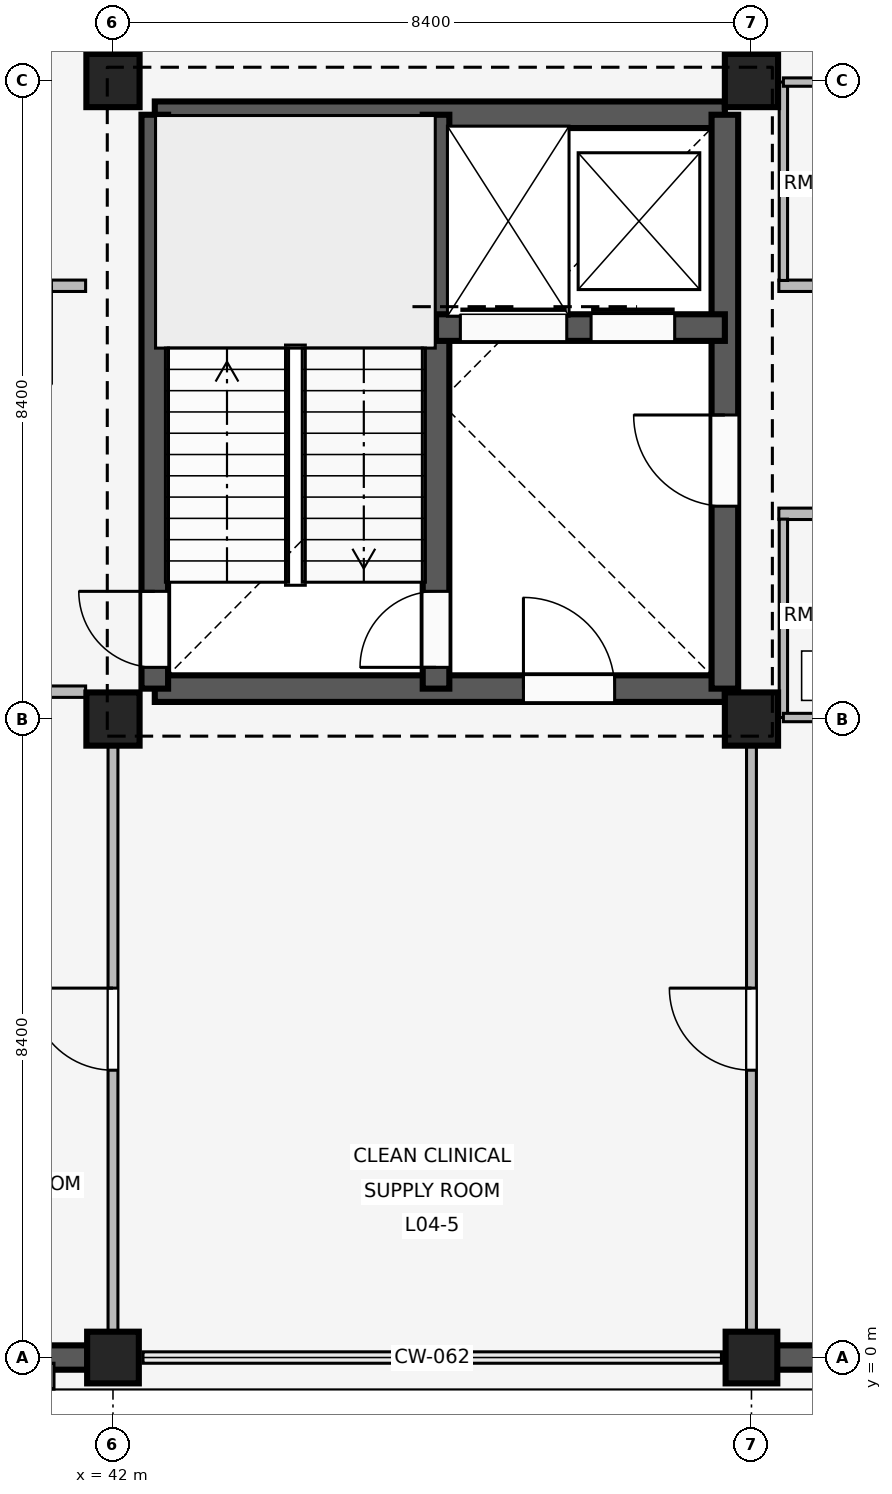
"""IFC4 building model, lengths in metres.
Left out: names, types, materials, properties, quantities, classifications, styles, units other than length and angle.
Written with IfcOpenShell. Run it as: python <this file> out.ifc"""

import sys

from ifc_helpers import new_model, si_unit, direction, frame, frame_2d, origin, origin_2d, place, context, subcontext, project, spatial, rectangle, extrude, element, fill, save


model = new_model("IFC4")
c1 = context("Model", 3, precision=1e-05, world=origin(), true_north=direction((0.0, 1.0)))
c2 = subcontext(c1, "Body", "Model", "MODEL_VIEW")
j1 = project(units=[si_unit("LENGTHUNIT", "METRE"), si_unit("PLANEANGLEUNIT", "RADIAN")], contexts=[c1])
p1 = place(None, origin())
s1 = spatial("IfcSite", under=j1, at=p1, CompositionType="ELEMENT")
p2 = place(p1, origin())
s2 = spatial("IfcBuilding", under=s1, at=p2, CompositionType="ELEMENT")
p3 = place(p2, frame((0.0, 0.0, 16.2)))
s3 = spatial("IfcBuildingStorey", under=s2, at=p3, CompositionType="ELEMENT", Elevation=16.2)
p4 = place(p3, frame((42.0, 0.0, 0.0), z_axis=(0.0, 0.0, 1.0), x_axis=(1.0, 0.0, 0.0)))
e1 = element("IfcColumn", 1, at=p4, inside=s3, PredefinedType="COLUMN", context=c2, shape_type="SweptSolid", body=[
    extrude(rectangle(XDim=0.68, YDim=0.68, at=origin_2d()), origin(), (0.0, 0.0, 1.0), 4.2),
])
for number, where, z_axis, x_axis in (
    (2, (42.0, 8.4, 0.0), (0.0, 0.0, 1.0), (1.0, 0.0, 0.0)),
    (3, (42.0, 16.8, 0.0), (0.0, 0.0, 1.0), (1.0, 0.0, 0.0)),
):
    element("IfcColumn", number, at=place(p3, frame(where, z_axis=z_axis, x_axis=x_axis)), inside=s3, PredefinedType="COLUMN", context=c2, shape_type="SweptSolid", body=[
        extrude(rectangle(XDim=0.7, YDim=0.7, at=origin_2d()), origin(), (0.0, 0.0, 1.0), 4.2),
    ])
p5 = place(p3, frame((50.4, 0.0, 0.0), z_axis=(0.0, 0.0, 1.0), x_axis=(1.0, 0.0, 0.0)))
e4 = element("IfcColumn", 4, at=p5, inside=s3, PredefinedType="COLUMN", context=c2, shape_type="SweptSolid", body=[
    extrude(rectangle(XDim=0.68, YDim=0.68, at=origin_2d()), origin(), (0.0, 0.0, 1.0), 4.2),
])
for number, where, z_axis, x_axis in (
    (5, (50.4, 8.4, 0.0), (0.0, 0.0, 1.0), (1.0, 0.0, 0.0)),
    (6, (50.4, 16.8, 0.0), (0.0, 0.0, 1.0), (1.0, 0.0, 0.0)),
):
    element("IfcColumn", number, at=place(p3, frame(where, z_axis=z_axis, x_axis=x_axis)), inside=s3, PredefinedType="COLUMN", context=c2, shape_type="SweptSolid", body=[
        extrude(rectangle(XDim=0.7, YDim=0.7, at=origin_2d()), origin(), (0.0, 0.0, 1.0), 4.2),
    ])
p6 = place(p3, frame((41.665, 0.0, 0.0), z_axis=(0.0, 0.0, 1.0), x_axis=(-1.0, 0.0, 0.0)))
e7 = element("IfcWall", 7, at=p6, inside=s3, PredefinedType="SOLIDWALL", context=c2, shape_type="SweptSolid", body=[
    extrude(rectangle(XDim=7.73, YDim=0.32, at=frame_2d((3.865, 0.0))), origin(), (0.0, 0.0, 1.0), 3.32),
])
p7 = place(p6, frame((0.52, 0.0, 0.85)))
e8 = element("IfcOpeningElement", 8, at=p7, cuts=e7, PredefinedType="OPENING", context=c2, shape_type="SweptSolid", body=[
    extrude(rectangle(XDim=1.44, YDim=1.62, at=frame_2d((0.72, 0.81))), frame((0.0, 0.17, 0.0), z_axis=(0.0, -1.0, 0.0), x_axis=(1.0, 0.0, 0.0)), (0.0, 0.0, 1.0), 0.34),
])
p8 = place(p6, frame((5.232, 0.0, 0.85)))
e9 = element("IfcOpeningElement", 9, at=p8, cuts=e7, PredefinedType="OPENING", context=c2, shape_type="SweptSolid", body=[
    extrude(rectangle(XDim=1.44, YDim=1.62, at=frame_2d((0.72, 0.81))), frame((0.0, 0.17, 0.0), z_axis=(0.0, -1.0, 0.0), x_axis=(1.0, 0.0, 0.0)), (0.0, 0.0, 1.0), 0.34),
])
p9 = place(p3, frame((41.124, -0.075, 0.0), z_axis=(0.0, 0.0, 1.0), x_axis=(0.0, -1.0, 0.0)))
e10 = element("IfcWall", 10, at=p9, inside=s3, PredefinedType="ELEMENTEDWALL", context=c2, shape_type="SweptSolid", body=[
    extrude(rectangle(XDim=0.34, YDim=0.2, at=frame_2d((0.17, 0.0))), origin(), (0.0, 0.0, 1.0), 3.3),
])
p10 = place(p3, frame((58.465, 0.0, 0.0), z_axis=(0.0, 0.0, 1.0), x_axis=(-1.0, 0.0, 0.0)))
e11 = element("IfcWall", 11, at=p10, inside=s3, PredefinedType="SOLIDWALL", context=c2, shape_type="SweptSolid", body=[
    extrude(rectangle(XDim=7.73, YDim=0.32, at=frame_2d((3.865, 0.0))), origin(), (0.0, 0.0, 1.0), 3.32),
])
p11 = place(p10, frame((1.148, 0.0, 0.85)))
e12 = element("IfcOpeningElement", 12, at=p11, cuts=e11, PredefinedType="OPENING", context=c2, shape_type="SweptSolid", body=[
    extrude(rectangle(XDim=1.26, YDim=1.52, at=frame_2d((0.63, 0.76))), frame((0.0, 0.17, 0.0), z_axis=(0.0, -1.0, 0.0), x_axis=(1.0, 0.0, 0.0)), (0.0, 0.0, 1.0), 0.34),
])
p12 = place(p10, frame((5.322, 0.0, 0.85)))
e13 = element("IfcOpeningElement", 13, at=p12, cuts=e11, PredefinedType="OPENING", context=c2, shape_type="SweptSolid", body=[
    extrude(rectangle(XDim=1.26, YDim=1.52, at=frame_2d((0.63, 0.76))), frame((0.0, 0.17, 0.0), z_axis=(0.0, -1.0, 0.0), x_axis=(1.0, 0.0, 0.0)), (0.0, 0.0, 1.0), 0.34),
])
p13 = place(p3, frame((42.55, 8.8, 0.0), z_axis=(0.0, 0.0, 1.0), x_axis=(1.0, 0.0, 0.0)))
e14 = element("IfcWall", 14, at=p13, inside=s3, PredefinedType="SHEAR", context=c2, shape_type="SweptSolid", body=[
    extrude(rectangle(XDim=7.5, YDim=0.35, at=frame_2d((3.75, 0.0))), origin(), (0.0, 0.0, 1.0), 3.92),
])
p14 = place(p13, frame((4.85, 0.0, 0.0)))
e15 = element("IfcOpeningElement", 15, at=p14, cuts=e14, PredefinedType="OPENING", context=c2, shape_type="SweptSolid", body=[
    extrude(rectangle(XDim=1.2, YDim=2.2, at=frame_2d((0.6, 1.1))), frame((0.0, 0.185, 0.0), z_axis=(0.0, -1.0, 0.0), x_axis=(1.0, 0.0, 0.0)), (0.0, 0.0, 1.0), 0.37),
])
p15 = place(p3, frame((42.55, 16.35, 0.0), z_axis=(0.0, 0.0, 1.0), x_axis=(1.0, 0.0, 0.0)))
e16 = element("IfcWall", 16, at=p15, inside=s3, PredefinedType="SHEAR", context=c2, shape_type="SweptSolid", body=[
    extrude(rectangle(XDim=7.5, YDim=0.35, at=frame_2d((3.75, 0.0))), origin(), (0.0, 0.0, 1.0), 3.92),
])
p16 = place(p3, frame((42.55, 8.8, 0.0), z_axis=(0.0, 0.0, 1.0), x_axis=(0.0, 1.0, 0.0)))
e17 = element("IfcWall", 17, at=p16, inside=s3, PredefinedType="SHEAR", context=c2, shape_type="SweptSolid", body=[
    extrude(rectangle(XDim=7.55, YDim=0.35, at=frame_2d((3.775, 0.0))), origin(), (0.0, 0.0, 1.0), 3.92),
])
p17 = place(p16, frame((0.28, 0.0, 0.0)))
e18 = element("IfcOpeningElement", 18, at=p17, cuts=e17, PredefinedType="OPENING", context=c2, shape_type="SweptSolid", body=[
    extrude(rectangle(XDim=1.0, YDim=2.15, at=frame_2d((0.5, 1.075))), frame((0.0, 0.185, 0.0), z_axis=(0.0, -1.0, 0.0), x_axis=(1.0, 0.0, 0.0)), (0.0, 0.0, 1.0), 0.37),
])
p18 = place(p3, frame((50.05, 8.8, 0.0), z_axis=(0.0, 0.0, 1.0), x_axis=(0.0, 1.0, 0.0)))
e19 = element("IfcWall", 19, at=p18, inside=s3, PredefinedType="SHEAR", context=c2, shape_type="SweptSolid", body=[
    extrude(rectangle(XDim=7.55, YDim=0.35, at=frame_2d((3.775, 0.0))), origin(), (0.0, 0.0, 1.0), 3.92),
])
p19 = place(p18, frame((2.4, 0.0, 0.0)))
e20 = element("IfcOpeningElement", 20, at=p19, cuts=e19, PredefinedType="OPENING", context=c2, shape_type="SweptSolid", body=[
    extrude(rectangle(XDim=1.2, YDim=2.2, at=frame_2d((0.6, 1.1))), frame((0.0, 0.185, 0.0), z_axis=(0.0, -1.0, 0.0), x_axis=(1.0, 0.0, 0.0)), (0.0, 0.0, 1.0), 0.37),
])
p20 = place(p3, frame((46.25, 8.8, 0.0), z_axis=(0.0, 0.0, 1.0), x_axis=(0.0, 1.0, 0.0)))
e21 = element("IfcWall", 21, at=p20, inside=s3, PredefinedType="SHEAR", context=c2, shape_type="SweptSolid", body=[
    extrude(rectangle(XDim=7.55, YDim=0.35, at=frame_2d((3.775, 0.0))), origin(), (0.0, 0.0, 1.0), 3.92),
])
p21 = place(p20, frame((0.28, 0.0, 0.0)))
e22 = element("IfcOpeningElement", 22, at=p21, cuts=e21, PredefinedType="OPENING", context=c2, shape_type="SweptSolid", body=[
    extrude(rectangle(XDim=1.0, YDim=2.15, at=frame_2d((0.5, 1.075))), frame((0.0, 0.185, 0.0), z_axis=(0.0, -1.0, 0.0), x_axis=(1.0, 0.0, 0.0)), (0.0, 0.0, 1.0), 0.37),
])
p22 = place(p3, frame((46.25, 13.55, 0.0), z_axis=(0.0, 0.0, 1.0), x_axis=(1.0, 0.0, 0.0)))
e23 = element("IfcWall", 23, at=p22, inside=s3, PredefinedType="SHEAR", context=c2, shape_type="SweptSolid", body=[
    extrude(rectangle(XDim=3.8, YDim=0.35, at=frame_2d((1.9, 0.0))), origin(), (0.0, 0.0, 1.0), 3.92),
])
p23 = place(p22, frame((0.32, 0.0, 0.0)))
e24 = element("IfcOpeningElement", 24, at=p23, cuts=e23, PredefinedType="OPENING", context=c2, shape_type="SweptSolid", body=[
    extrude(rectangle(XDim=1.4, YDim=2.25, at=frame_2d((0.7, 1.125))), frame((0.0, 0.185, 0.0), z_axis=(0.0, -1.0, 0.0), x_axis=(1.0, 0.0, 0.0)), (0.0, 0.0, 1.0), 0.37),
])
p24 = place(p22, frame((2.04, 0.0, 0.0)))
e25 = element("IfcOpeningElement", 25, at=p24, cuts=e23, PredefinedType="OPENING", context=c2, shape_type="SweptSolid", body=[
    extrude(rectangle(XDim=1.1, YDim=2.15, at=frame_2d((0.55, 1.075))), frame((0.0, 0.185, 0.0), z_axis=(0.0, -1.0, 0.0), x_axis=(1.0, 0.0, 0.0)), (0.0, 0.0, 1.0), 0.37),
])
p25 = place(p3, frame((39.46, 8.76, 0.0), z_axis=(0.0, 0.0, 1.0), x_axis=(1.0, 0.0, 0.0)))
e26 = element("IfcWall", 26, at=p25, inside=s3, PredefinedType="PARTITIONING", context=c2, shape_type="SweptSolid", body=[
    extrude(rectangle(XDim=2.18, YDim=0.15, at=frame_2d((1.09, 0.0))), origin(), (0.0, 0.0, 1.0), 3.3),
])
p26 = place(p25, frame((0.5, 0.0, 0.0)))
e27 = element("IfcOpeningElement", 27, at=p26, cuts=e26, PredefinedType="OPENING", context=c2, shape_type="SweptSolid", body=[
    extrude(rectangle(XDim=1.08, YDim=2.15, at=frame_2d((0.54, 1.075))), frame((0.0, 0.085, 0.0), z_axis=(0.0, -1.0, 0.0), x_axis=(1.0, 0.0, 0.0)), (0.0, 0.0, 1.0), 0.17),
])
p27 = place(p3, frame((41.64, 14.1, 0.0), z_axis=(0.0, 0.0, 1.0), x_axis=(-1.0, 0.0, 0.0)))
e28 = element("IfcWall", 28, at=p27, inside=s3, PredefinedType="PARTITIONING", context=c2, shape_type="SweptSolid", body=[
    extrude(rectangle(XDim=7.96, YDim=0.15, at=frame_2d((3.98, 0.0))), origin(), (0.0, 0.0, 1.0), 3.3),
])
p28 = place(p27, frame((0.45, 0.0, 0.0)))
e29 = element("IfcOpeningElement", 29, at=p28, cuts=e28, PredefinedType="OPENING", context=c2, shape_type="SweptSolid", body=[
    extrude(rectangle(XDim=1.3, YDim=2.25, at=frame_2d((0.65, 1.125))), frame((0.0, 0.085, 0.0), z_axis=(0.0, -1.0, 0.0), x_axis=(1.0, 0.0, 0.0)), (0.0, 0.0, 1.0), 0.17),
])
p29 = place(p27, frame((4.15, 0.0, 0.0)))
e30 = element("IfcOpeningElement", 30, at=p29, cuts=e28, PredefinedType="OPENING", context=c2, shape_type="SweptSolid", body=[
    extrude(rectangle(XDim=1.3, YDim=2.25, at=frame_2d((0.65, 1.125))), frame((0.0, 0.085, 0.0), z_axis=(0.0, -1.0, 0.0), x_axis=(1.0, 0.0, 0.0)), (0.0, 0.0, 1.0), 0.17),
])
p30 = place(p3, frame((42.0, 0.14, 0.0), z_axis=(0.0, 0.0, 1.0), x_axis=(0.0, 1.0, 0.0)))
e31 = element("IfcWall", 31, at=p30, inside=s3, PredefinedType="PARTITIONING", context=c2, shape_type="SweptSolid", body=[
    extrude(rectangle(XDim=8.21, YDim=0.13, at=frame_2d((4.105, 0.0))), origin(), (0.0, 0.0, 1.0), 3.3),
])
p31 = place(p30, frame((3.64, 0.0, 0.0)))
e32 = element("IfcOpeningElement", 32, at=p31, cuts=e31, PredefinedType="OPENING", context=c2, shape_type="SweptSolid", body=[
    extrude(rectangle(XDim=1.08, YDim=2.15, at=frame_2d((0.54, 1.075))), frame((0.0, 0.075, 0.0), z_axis=(0.0, -1.0, 0.0), x_axis=(1.0, 0.0, 0.0)), (0.0, 0.0, 1.0), 0.15),
])
p32 = place(p3, frame((42.0, 17.15, 0.0), z_axis=(0.0, 0.0, 1.0), x_axis=(0.0, 1.0, 0.0)))
e33 = element("IfcWall", 33, at=p32, inside=s3, PredefinedType="PARTITIONING", context=c2, shape_type="SweptSolid", body=[
    extrude(rectangle(XDim=7.91, YDim=0.13, at=frame_2d((3.955, 0.0))), origin(), (0.0, 0.0, 1.0), 3.3),
])
p33 = place(p32, frame((3.4, 0.0, 0.0)))
e34 = element("IfcOpeningElement", 34, at=p33, cuts=e33, PredefinedType="OPENING", context=c2, shape_type="SweptSolid", body=[
    extrude(rectangle(XDim=1.05, YDim=2.2, at=frame_2d((0.525, 1.1))), frame((0.0, 0.075, 0.0), z_axis=(0.0, -1.0, 0.0), x_axis=(1.0, 0.0, 0.0)), (0.0, 0.0, 1.0), 0.15),
])
p34 = place(p3, frame((50.4, 0.14, 0.0), z_axis=(0.0, 0.0, 1.0), x_axis=(0.0, 1.0, 0.0)))
e35 = element("IfcWall", 35, at=p34, inside=s3, PredefinedType="PARTITIONING", context=c2, shape_type="SweptSolid", body=[
    extrude(rectangle(XDim=8.21, YDim=0.13, at=frame_2d((4.105, 0.0))), origin(), (0.0, 0.0, 1.0), 3.3),
])
p35 = place(p34, frame((3.64, 0.0, 0.0)))
e36 = element("IfcOpeningElement", 36, at=p35, cuts=e35, PredefinedType="OPENING", context=c2, shape_type="SweptSolid", body=[
    extrude(rectangle(XDim=1.08, YDim=2.15, at=frame_2d((0.54, 1.075))), frame((0.0, 0.075, 0.0), z_axis=(0.0, -1.0, 0.0), x_axis=(1.0, 0.0, 0.0)), (0.0, 0.0, 1.0), 0.15),
])
p36 = place(p3, frame((50.4, 17.15, 0.0), z_axis=(0.0, 0.0, 1.0), x_axis=(0.0, 1.0, 0.0)))
e37 = element("IfcWall", 37, at=p36, inside=s3, PredefinedType="PARTITIONING", context=c2, shape_type="SweptSolid", body=[
    extrude(rectangle(XDim=7.91, YDim=0.13, at=frame_2d((3.955, 0.0))), origin(), (0.0, 0.0, 1.0), 3.3),
])
p37 = place(p36, frame((3.4, 0.0, 0.0)))
e38 = element("IfcOpeningElement", 38, at=p37, cuts=e37, PredefinedType="OPENING", context=c2, shape_type="SweptSolid", body=[
    extrude(rectangle(XDim=1.05, YDim=2.2, at=frame_2d((0.525, 1.1))), frame((0.0, 0.075, 0.0), z_axis=(0.0, -1.0, 0.0), x_axis=(1.0, 0.0, 0.0)), (0.0, 0.0, 1.0), 0.15),
])
p38 = place(p3, frame((50.76, 11.1, 0.0), z_axis=(0.0, 0.0, 1.0), x_axis=(1.0, 0.0, 0.0)))
e39 = element("IfcWall", 39, at=p38, inside=s3, PredefinedType="PARTITIONING", context=c2, shape_type="SweptSolid", body=[
    extrude(rectangle(XDim=7.96, YDim=0.15, at=frame_2d((3.98, 0.0))), origin(), (0.0, 0.0, 1.0), 3.3),
])
p39 = place(p38, frame((2.25, 0.0, 0.0)))
e40 = element("IfcOpeningElement", 40, at=p39, cuts=e39, PredefinedType="OPENING", context=c2, shape_type="SweptSolid", body=[
    extrude(rectangle(XDim=1.3, YDim=2.25, at=frame_2d((0.65, 1.125))), frame((0.0, 0.085, 0.0), z_axis=(0.0, -1.0, 0.0), x_axis=(1.0, 0.0, 0.0)), (0.0, 0.0, 1.0), 0.17),
])
p40 = place(p38, frame((5.95, 0.0, 0.0)))
e41 = element("IfcOpeningElement", 41, at=p40, cuts=e39, PredefinedType="OPENING", context=c2, shape_type="SweptSolid", body=[
    extrude(rectangle(XDim=1.3, YDim=2.25, at=frame_2d((0.65, 1.125))), frame((0.0, 0.085, 0.0), z_axis=(0.0, -1.0, 0.0), x_axis=(1.0, 0.0, 0.0)), (0.0, 0.0, 1.0), 0.17),
])
p41 = place(p3, frame((50.82, 8.42, 0.0), z_axis=(0.0, 0.0, 1.0), x_axis=(0.0, 1.0, 0.0)))
e42 = element("IfcWall", 42, at=p41, inside=s3, PredefinedType="PARTITIONING", context=c2, shape_type="SweptSolid", body=[
    extrude(rectangle(XDim=2.61, YDim=0.11, at=frame_2d((1.305, 0.0))), origin(), (0.0, 0.0, 1.0), 3.3),
])
p42 = place(p3, frame((50.82, 8.42, 0.0), z_axis=(0.0, 0.0, 1.0), x_axis=(1.0, 0.0, 0.0)))
e43 = element("IfcWall", 43, at=p42, inside=s3, PredefinedType="PARTITIONING", context=c2, shape_type="SweptSolid", body=[
    extrude(rectangle(XDim=1.98, YDim=0.11, at=frame_2d((0.99, 0.0))), origin(), (0.0, 0.0, 1.0), 3.3),
])
p43 = place(p42, frame((0.54, 0.0, 0.0)))
e44 = element("IfcOpeningElement", 44, at=p43, cuts=e43, PredefinedType="OPENING", context=c2, shape_type="SweptSolid", body=[
    extrude(rectangle(XDim=0.9, YDim=2.1, at=frame_2d((0.45, 1.05))), frame((0.0, 0.065, 0.0), z_axis=(0.0, -1.0, 0.0), x_axis=(1.0, 0.0, 0.0)), (0.0, 0.0, 1.0), 0.13),
])
p44 = place(p3, frame((58.72, 14.1, 0.0), z_axis=(0.0, 0.0, 1.0), x_axis=(-1.0, 0.0, 0.0)))
e45 = element("IfcWall", 45, at=p44, inside=s3, PredefinedType="PARTITIONING", context=c2, shape_type="SweptSolid", body=[
    extrude(rectangle(XDim=7.96, YDim=0.15, at=frame_2d((3.98, 0.0))), origin(), (0.0, 0.0, 1.0), 3.3),
])
p45 = place(p44, frame((0.73, 0.0, 0.0)))
e46 = element("IfcOpeningElement", 46, at=p45, cuts=e45, PredefinedType="OPENING", context=c2, shape_type="SweptSolid", body=[
    extrude(rectangle(XDim=1.3, YDim=2.25, at=frame_2d((0.65, 1.125))), frame((0.0, 0.085, 0.0), z_axis=(0.0, -1.0, 0.0), x_axis=(1.0, 0.0, 0.0)), (0.0, 0.0, 1.0), 0.17),
])
p46 = place(p44, frame((4.43, 0.0, 0.0)))
e47 = element("IfcOpeningElement", 47, at=p46, cuts=e45, PredefinedType="OPENING", context=c2, shape_type="SweptSolid", body=[
    extrude(rectangle(XDim=1.3, YDim=2.25, at=frame_2d((0.65, 1.125))), frame((0.0, 0.085, 0.0), z_axis=(0.0, -1.0, 0.0), x_axis=(1.0, 0.0, 0.0)), (0.0, 0.0, 1.0), 0.17),
])
p47 = place(p3, frame((50.82, 14.17, 0.0), z_axis=(0.0, 0.0, 1.0), x_axis=(0.0, 1.0, 0.0)))
e48 = element("IfcWall", 48, at=p47, inside=s3, PredefinedType="PARTITIONING", context=c2, shape_type="SweptSolid", body=[
    extrude(rectangle(XDim=2.61, YDim=0.11, at=frame_2d((1.305, 0.0))), origin(), (0.0, 0.0, 1.0), 3.3),
])
p48 = place(p3, frame((50.82, 16.78, 0.0), z_axis=(0.0, 0.0, 1.0), x_axis=(1.0, 0.0, 0.0)))
e49 = element("IfcWall", 49, at=p48, inside=s3, PredefinedType="PARTITIONING", context=c2, shape_type="SweptSolid", body=[
    extrude(rectangle(XDim=1.98, YDim=0.11, at=frame_2d((0.99, 0.0))), origin(), (0.0, 0.0, 1.0), 3.3),
])
p49 = place(p48, frame((0.54, 0.0, 0.0)))
e50 = element("IfcOpeningElement", 50, at=p49, cuts=e49, PredefinedType="OPENING", context=c2, shape_type="SweptSolid", body=[
    extrude(rectangle(XDim=0.9, YDim=2.1, at=frame_2d((0.45, 1.05))), frame((0.0, 0.065, 0.0), z_axis=(0.0, -1.0, 0.0), x_axis=(1.0, 0.0, 0.0)), (0.0, 0.0, 1.0), 0.13),
])
p50 = place(p19, origin())
e51 = element("IfcDoor", 51, at=p50, inside=s3, OperationType="SINGLE_SWING_RIGHT", PredefinedType="DOOR", context=c2, shape_type="SweptSolid", body=[
    extrude(rectangle(XDim=1.2, YDim=2.2, at=frame_2d((0.6, 1.1))), frame((0.0, 0.025, 0.0), z_axis=(0.0, -1.0, 0.0), x_axis=(1.0, 0.0, 0.0)), (0.0, 0.0, 1.0), 0.05),
])
fill(e20, e51)
p51 = place(p14, origin())
e52 = element("IfcDoor", 52, at=p51, inside=s3, OperationType="SINGLE_SWING_LEFT", PredefinedType="DOOR", context=c2, shape_type="SweptSolid", body=[
    extrude(rectangle(XDim=1.2, YDim=2.2, at=frame_2d((0.6, 1.1))), frame((0.0, 0.025, 0.0), z_axis=(0.0, -1.0, 0.0), x_axis=(1.0, 0.0, 0.0)), (0.0, 0.0, 1.0), 0.05),
])
fill(e15, e52)
p52 = place(p17, origin())
e53 = element("IfcDoor", 53, at=p52, inside=s3, OperationType="SINGLE_SWING_RIGHT", PredefinedType="DOOR", context=c2, shape_type="SweptSolid", body=[
    extrude(rectangle(XDim=1.0, YDim=2.15, at=frame_2d((0.5, 1.075))), frame((0.0, 0.025, 0.0), z_axis=(0.0, -1.0, 0.0), x_axis=(1.0, 0.0, 0.0)), (0.0, 0.0, 1.0), 0.05),
])
fill(e18, e53)
p53 = place(p21, origin())
e54 = element("IfcDoor", 54, at=p53, inside=s3, OperationType="SINGLE_SWING_LEFT", PredefinedType="DOOR", context=c2, shape_type="SweptSolid", body=[
    extrude(rectangle(XDim=1.0, YDim=2.15, at=frame_2d((0.5, 1.075))), frame((0.0, 0.025, 0.0), z_axis=(0.0, -1.0, 0.0), x_axis=(1.0, 0.0, 0.0)), (0.0, 0.0, 1.0), 0.05),
])
fill(e22, e54)
p54 = place(p23, origin())
e55 = element("IfcDoor", 55, at=p54, inside=s3, OperationType="SLIDING_TO_LEFT", PredefinedType="DOOR", context=c2, shape_type="SweptSolid", body=[
    extrude(rectangle(XDim=1.4, YDim=2.25, at=frame_2d((0.7, 1.125))), frame((0.0, 0.025, 0.0), z_axis=(0.0, -1.0, 0.0), x_axis=(1.0, 0.0, 0.0)), (0.0, 0.0, 1.0), 0.05),
])
fill(e24, e55)
p55 = place(p24, origin())
e56 = element("IfcDoor", 56, at=p55, inside=s3, OperationType="SLIDING_TO_LEFT", PredefinedType="DOOR", context=c2, shape_type="SweptSolid", body=[
    extrude(rectangle(XDim=1.1, YDim=2.15, at=frame_2d((0.55, 1.075))), frame((0.0, 0.025, 0.0), z_axis=(0.0, -1.0, 0.0), x_axis=(1.0, 0.0, 0.0)), (0.0, 0.0, 1.0), 0.05),
])
fill(e25, e56)
p56 = place(p31, origin())
e57 = element("IfcDoor", 57, at=p56, inside=s3, OperationType="SINGLE_SWING_RIGHT", PredefinedType="DOOR", context=c2, shape_type="SweptSolid", body=[
    extrude(rectangle(XDim=1.08, YDim=2.15, at=frame_2d((0.54, 1.075))), frame((0.0, 0.025, 0.0), z_axis=(0.0, -1.0, 0.0), x_axis=(1.0, 0.0, 0.0)), (0.0, 0.0, 1.0), 0.05),
])
fill(e32, e57)
p57 = place(p35, origin())
e58 = element("IfcDoor", 58, at=p57, inside=s3, OperationType="SINGLE_SWING_RIGHT", PredefinedType="DOOR", context=c2, shape_type="SweptSolid", body=[
    extrude(rectangle(XDim=1.08, YDim=2.15, at=frame_2d((0.54, 1.075))), frame((0.0, 0.025, 0.0), z_axis=(0.0, -1.0, 0.0), x_axis=(1.0, 0.0, 0.0)), (0.0, 0.0, 1.0), 0.05),
])
fill(e36, e58)
save(model, sys.argv[1])
